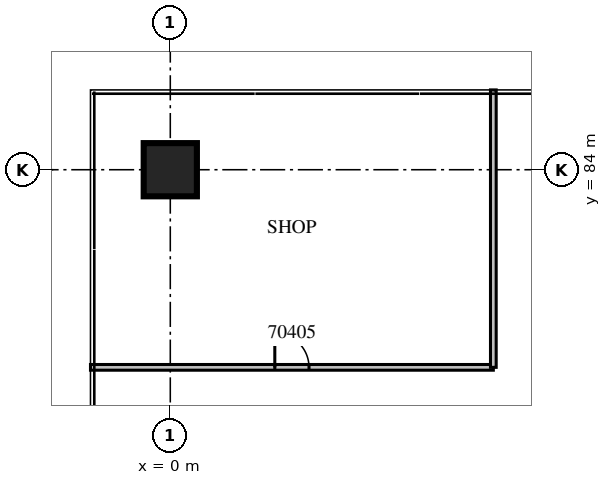
"""IFC4 building model, lengths in metres.
Left out: names, types, materials, properties, quantities, classifications, styles, units other than length and angle.
Written with IfcOpenShell. Run it as: python <this file> out.ifc"""

import sys

from ifc_helpers import new_model, si_unit, direction, frame, frame_2d, origin, origin_2d, place, context, subcontext, project, spatial, rectangle, extrude, source, transform, mapped, element, fill, save


model = new_model("IFC4")
c1 = context("Model", 3, precision=1e-05, world=origin(), true_north=direction((0.0, 1.0)))
c2 = subcontext(c1, "Body", "Model", "MODEL_VIEW")
j1 = project(units=[si_unit("LENGTHUNIT", "METRE"), si_unit("PLANEANGLEUNIT", "RADIAN")], contexts=[c1])
p1 = place(None, origin())
s1 = spatial("IfcSite", under=j1, at=p1, CompositionType="ELEMENT")
p2 = place(p1, origin())
s2 = spatial("IfcBuilding", under=s1, at=p2, CompositionType="ELEMENT")
p3 = place(p2, frame((0.0, 0.0, 7.5)))
s3 = spatial("IfcBuildingStorey", under=s2, at=p3, CompositionType="ELEMENT", Elevation=7.5)
m1 = source(origin(), c2, "Body", "SweptSolid", [
    extrude(rectangle(XDim=1.4, YDim=1.4, at=origin_2d()), origin(), (0.0, 0.0, 1.0), 5.4),
])
p4 = place(p3, frame((0.0, 84.0, 0.0), z_axis=(0.0, 0.0, 1.0), x_axis=(1.0, 0.0, 0.0)))
e1 = element("IfcColumn", 1, at=p4, inside=s3, PredefinedType="COLUMN", context=c2, shape_type="MappedRepresentation", body=[
    mapped(m1, transform((0.0, 0.0, 0.0), scale=1.0)),
])
m2 = source(origin(), c2, "Body", "SweptSolid", [
    extrude(rectangle(XDim=10.6, YDim=0.15, at=frame_2d((5.3, 0.0))), origin(), (0.0, 0.0, 1.0), 4.8),
])
p5 = place(p3, frame((-2.1, 78.8, 0.0), z_axis=(0.0, 0.0, 1.0), x_axis=(1.0, 0.0, 0.0)))
e2 = element("IfcWall", 2, at=p5, inside=s3, PredefinedType="PARTITIONING", context=c2, shape_type="MappedRepresentation", body=[
    mapped(m2, transform((0.0, 0.0, 0.0), scale=1.0)),
])
m3 = source(origin(), c2, "Body", "SweptSolid", [
    extrude(rectangle(XDim=0.9, YDim=2.1, at=frame_2d((0.45, 1.05))), frame((0.0, 0.085, 0.0), z_axis=(0.0, -1.0, 0.0), x_axis=(1.0, 0.0, 0.0)), (0.0, 0.0, 1.0), 0.17),
])
p6 = place(p5, frame((4.85, 0.0, 0.0)))
e3 = element("IfcOpeningElement", 3, at=p6, cuts=e2, PredefinedType="OPENING", context=c2, shape_type="MappedRepresentation", body=[
    mapped(m3, transform((0.0, 0.0, 0.0), scale=1.0)),
])
m4 = source(origin(), c2, "Body", "SweptSolid", [
    extrude(rectangle(XDim=7.3, YDim=0.15, at=frame_2d((3.65, 0.0))), origin(), (0.0, 0.0, 1.0), 4.8),
])
p7 = place(p3, frame((8.5, 78.8, 0.0), z_axis=(0.0, 0.0, 1.0), x_axis=(0.0, 1.0, 0.0)))
e4 = element("IfcWall", 4, at=p7, inside=s3, PredefinedType="PARTITIONING", context=c2, shape_type="MappedRepresentation", body=[
    mapped(m4, transform((0.0, 0.0, 0.0), scale=1.0)),
])
m5 = source(origin(), c2, "Body", "SweptSolid", [
    extrude(rectangle(XDim=0.9, YDim=2.1, at=frame_2d((0.45, 1.05))), frame((0.0, 0.025, 0.0), z_axis=(0.0, -1.0, 0.0), x_axis=(1.0, 0.0, 0.0)), (0.0, 0.0, 1.0), 0.05),
])
p8 = place(p6, origin())
e5 = element("IfcDoor", 5, at=p8, inside=s3, OperationType="SINGLE_SWING_LEFT", PredefinedType="DOOR", context=c2, shape_type="MappedRepresentation", body=[
    mapped(m5, transform((0.0, 0.0, 0.0), scale=1.0)),
])
fill(e3, e5)
save(model, sys.argv[1])
